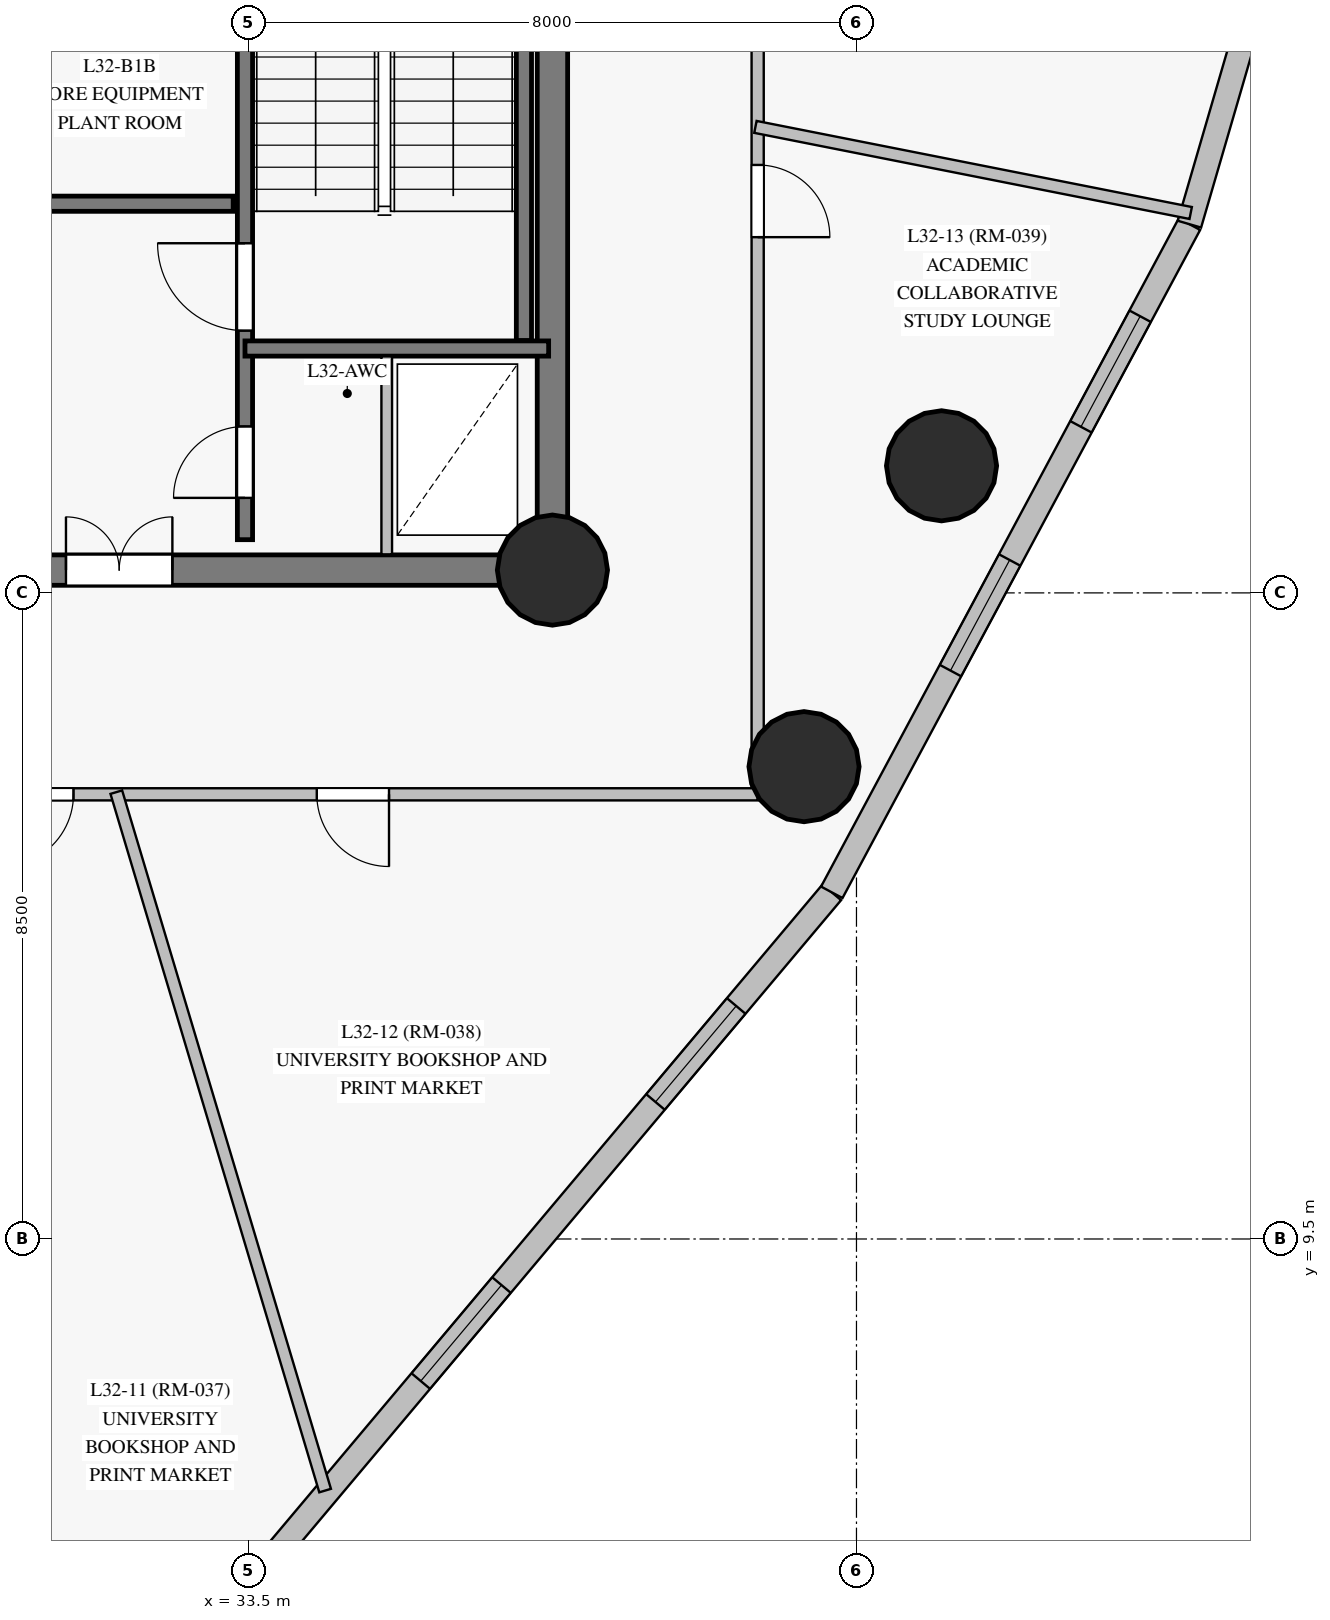
"""IFC4 building model, lengths in metres.
Left out: names, types, materials, properties, quantities, classifications, styles, units other than length and angle.
Written with IfcOpenShell. Run it as: python <this file> out.ifc"""

import sys

from ifc_helpers import new_model, si_unit, direction, frame, frame_2d, origin, origin_with_axes, origin_2d, place, context, subcontext, project, spatial, rectangle, circle, extrude, source, transform, mapped, element, fill, save


model = new_model("IFC4")
c1 = context("Model", 3, precision=1e-05, world=origin(), true_north=direction((0.0, 1.0)))
c2 = subcontext(c1, "Body", "Model", "MODEL_VIEW")
j1 = project(units=[si_unit("LENGTHUNIT", "METRE"), si_unit("PLANEANGLEUNIT", "RADIAN")], contexts=[c1])
p1 = place(None, origin())
s1 = spatial("IfcSite", under=j1, at=p1, CompositionType="ELEMENT")
p2 = place(p1, origin())
s2 = spatial("IfcBuilding", under=s1, at=p2, CompositionType="ELEMENT")
p3 = place(p2, frame((0.0, 0.0, 117.55)))
s3 = spatial("IfcBuildingStorey", under=s2, at=p3, CompositionType="ELEMENT", Elevation=117.55)
p4 = place(p3, frame((26.55, 18.3, 0.0), z_axis=(0.0, 0.0, 1.0), x_axis=(1.0, 0.0, 0.0)))
e1 = element("IfcWall", 1, at=p4, inside=s3, PredefinedType="SHEAR", context=c2, shape_type="SweptSolid", body=[
    extrude(rectangle(XDim=10.95, YDim=0.4, at=frame_2d((5.475, 0.0))), origin(), (0.0, 0.0, 1.0), 2.825),
])
p5 = place(p4, frame((4.55, 0.0, 0.0)))
e2 = element("IfcOpeningElement", 2, at=p5, cuts=e1, PredefinedType="OPENING", context=c2, shape_type="SweptSolid", body=[
    extrude(rectangle(XDim=1.4, YDim=2.2, at=frame_2d((0.7, 1.1))), frame((0.0, 0.21, 0.0), z_axis=(0.0, -1.0, 0.0), x_axis=(1.0, 0.0, 0.0)), (0.0, 0.0, 1.0), 0.42),
])
p6 = place(p3, frame((37.5, 18.3, 0.0), z_axis=(0.0, 0.0, 1.0), x_axis=(0.0, 1.0, 0.0)))
e3 = element("IfcWall", 3, at=p6, inside=s3, PredefinedType="SHEAR", context=c2, shape_type="SweptSolid", body=[
    extrude(rectangle(XDim=16.4, YDim=0.4, at=frame_2d((8.2, 0.0))), origin(), (0.0, 0.0, 1.0), 2.825),
])
p7 = place(p6, frame((14.15, 0.0, 0.0)))
e4 = element("IfcOpeningElement", 4, at=p7, cuts=e3, PredefinedType="OPENING", context=c2, shape_type="SweptSolid", body=[
    extrude(rectangle(XDim=1.2, YDim=2.15, at=frame_2d((0.6, 1.075))), frame((0.0, 0.21, 0.0), z_axis=(0.0, -1.0, 0.0), x_axis=(1.0, 0.0, 0.0)), (0.0, 0.0, 1.0), 0.42),
])
m1 = source(origin_with_axes(), c2, "Body", "SweptSolid", [
    extrude(circle(Radius=0.725, at=origin_2d()), origin(), (0.0, 0.0, 1.0), 3.05),
])
for number, where, z_axis, x_axis in (
    (5, (37.5, 18.3, 0.0), (0.0, 0.0, 1.0), (1.0, 0.0, 0.0)),
    (6, (42.619, 19.672, 0.0), (0.0, 0.0, 1.0), (1.0, 0.0, 0.0)),
    (7, (40.81, 15.714, 0.0), (0.0, 0.0, 1.0), (1.0, 0.0, 0.0)),
):
    element("IfcColumn", number, at=place(p3, frame(where, z_axis=z_axis, x_axis=x_axis)), inside=s3, PredefinedType="COLUMN", context=c2, shape_type="MappedRepresentation", body=[
        mapped(m1, transform((0.0, 0.0, 0.0), scale=1.0)),
    ])
p8 = place(p3, frame((31.944, 3.083, 0.0), z_axis=(0.0, 0.0, 1.0), x_axis=(0.643621916948, 0.765343601283, 0.0)))
e8 = element("IfcWall", 8, at=p8, inside=s3, PredefinedType="SOLIDWALL", context=c2, shape_type="SweptSolid", body=[
    extrude(rectangle(XDim=14.343, YDim=0.32, at=frame_2d((7.171, 0.0))), origin(), (0.0, 0.0, 1.0), 2.825),
])
p9 = place(p8, frame((1.229, 0.0, 0.85)))
e9 = element("IfcOpeningElement", 9, at=p9, cuts=e8, PredefinedType="OPENING", context=c2, shape_type="SweptSolid", body=[
    extrude(rectangle(XDim=1.65, YDim=1.65, at=frame_2d((0.825, 0.825))), frame((0.0, 0.17, 0.0), z_axis=(0.0, -1.0, 0.0), x_axis=(1.0, 0.0, 0.0)), (0.0, 0.0, 1.0), 0.34),
])
p10 = place(p8, frame((5.942, 0.0, 0.85)))
e10 = element("IfcOpeningElement", 10, at=p10, cuts=e8, PredefinedType="OPENING", context=c2, shape_type="SweptSolid", body=[
    extrude(rectangle(XDim=1.65, YDim=1.65, at=frame_2d((0.825, 0.825))), frame((0.0, 0.17, 0.0), z_axis=(0.0, -1.0, 0.0), x_axis=(1.0, 0.0, 0.0)), (0.0, 0.0, 1.0), 0.34),
])
p11 = place(p8, frame((10.739, 0.0, 0.85)))
e11 = element("IfcOpeningElement", 11, at=p11, cuts=e8, PredefinedType="OPENING", context=c2, shape_type="SweptSolid", body=[
    extrude(rectangle(XDim=1.65, YDim=1.65, at=frame_2d((0.825, 0.825))), frame((0.0, 0.17, 0.0), z_axis=(0.0, -1.0, 0.0), x_axis=(1.0, 0.0, 0.0)), (0.0, 0.0, 1.0), 0.34),
])
p12 = place(p3, frame((41.175, 14.061, 0.0), z_axis=(0.0, 0.0, 1.0), x_axis=(0.471938707329, 0.881631360902, 0.0)))
e12 = element("IfcWall", 12, at=p12, inside=s3, PredefinedType="SOLIDWALL", context=c2, shape_type="SweptSolid", body=[
    extrude(rectangle(XDim=9.97, YDim=0.32, at=frame_2d((4.985, 0.0))), origin(), (0.0, 0.0, 1.0), 2.825),
])
p13 = place(p12, frame((3.309, 0.0, 0.85)))
e13 = element("IfcOpeningElement", 13, at=p13, cuts=e12, PredefinedType="OPENING", context=c2, shape_type="SweptSolid", body=[
    extrude(rectangle(XDim=1.65, YDim=1.65, at=frame_2d((0.825, 0.825))), frame((0.0, 0.17, 0.0), z_axis=(0.0, -1.0, 0.0), x_axis=(1.0, 0.0, 0.0)), (0.0, 0.0, 1.0), 0.34),
])
p14 = place(p12, frame((6.947, 0.0, 0.85)))
e14 = element("IfcOpeningElement", 14, at=p14, cuts=e12, PredefinedType="OPENING", context=c2, shape_type="SweptSolid", body=[
    extrude(rectangle(XDim=1.65, YDim=1.65, at=frame_2d((0.825, 0.825))), frame((0.0, 0.17, 0.0), z_axis=(0.0, -1.0, 0.0), x_axis=(1.0, 0.0, 0.0)), (0.0, 0.0, 1.0), 0.34),
])
p15 = place(p3, frame((45.88, 22.851, 0.0), z_axis=(0.0, 0.0, 1.0), x_axis=(0.279941825512, 0.960016965647, 0.0)))
e15 = element("IfcWall", 15, at=p15, inside=s3, PredefinedType="SOLIDWALL", context=c2, shape_type="SweptSolid", body=[
    extrude(rectangle(XDim=14.343, YDim=0.32, at=frame_2d((7.171, 0.0))), origin(), (0.0, 0.0, 1.0), 2.825),
])
p16 = place(p15, frame((2.843, 0.0, 0.85)))
e16 = element("IfcOpeningElement", 16, at=p16, cuts=e15, PredefinedType="OPENING", context=c2, shape_type="SweptSolid", body=[
    extrude(rectangle(XDim=1.65, YDim=1.65, at=frame_2d((0.825, 0.825))), frame((0.0, 0.17, 0.0), z_axis=(0.0, -1.0, 0.0), x_axis=(1.0, 0.0, 0.0)), (0.0, 0.0, 1.0), 0.34),
])
p17 = place(p15, frame((9.076, 0.0, 0.85)))
e17 = element("IfcOpeningElement", 17, at=p17, cuts=e15, PredefinedType="OPENING", context=c2, shape_type="SweptSolid", body=[
    extrude(rectangle(XDim=1.65, YDim=1.65, at=frame_2d((0.825, 0.825))), frame((0.0, 0.17, 0.0), z_axis=(0.0, -1.0, 0.0), x_axis=(1.0, 0.0, 0.0)), (0.0, 0.0, 1.0), 0.34),
])
p18 = place(p3, frame((33.455, 18.7, 0.0), z_axis=(0.0, 0.0, 1.0), x_axis=(0.0, 1.0, 0.0)))
e18 = element("IfcWall", 18, at=p18, inside=s3, PredefinedType="SHEAR", context=c2, shape_type="SweptSolid", body=[
    extrude(rectangle(XDim=15.6, YDim=0.2, at=frame_2d((7.8, 0.0))), origin(), (0.0, 0.0, 1.0), 2.825),
])
p19 = place(p18, frame((2.75, 0.0, 0.0)))
e19 = element("IfcOpeningElement", 19, at=p19, cuts=e18, PredefinedType="OPENING", context=c2, shape_type="SweptSolid", body=[
    extrude(rectangle(XDim=1.15, YDim=2.15, at=frame_2d((0.575, 1.075))), frame((0.0, 0.11, 0.0), z_axis=(0.0, -1.0, 0.0), x_axis=(1.0, 0.0, 0.0)), (0.0, 0.0, 1.0), 0.22),
])
p20 = place(p18, frame((0.55, 0.0, 0.0)))
e20 = element("IfcOpeningElement", 20, at=p20, cuts=e18, PredefinedType="OPENING", context=c2, shape_type="SweptSolid", body=[
    extrude(rectangle(XDim=0.94, YDim=2.1, at=frame_2d((0.47, 1.05))), frame((0.0, 0.11, 0.0), z_axis=(0.0, -1.0, 0.0), x_axis=(1.0, 0.0, 0.0)), (0.0, 0.0, 1.0), 0.22),
])
p21 = place(p3, frame((23.7, 23.12, 0.0), z_axis=(0.0, 0.0, 1.0), x_axis=(1.0, 0.0, 0.0)))
e21 = element("IfcWall", 21, at=p21, inside=s3, PredefinedType="SHEAR", context=c2, shape_type="SweptSolid", body=[
    extrude(rectangle(XDim=9.6, YDim=0.2, at=frame_2d((4.8, 0.0))), origin(), (0.0, 0.0, 1.0), 2.825),
])
p22 = place(p21, frame((1.1, 0.0, 0.0)))
e22 = element("IfcOpeningElement", 22, at=p22, cuts=e21, PredefinedType="OPENING", context=c2, shape_type="SweptSolid", body=[
    extrude(rectangle(XDim=0.92, YDim=2.1, at=frame_2d((0.46, 1.05))), frame((0.0, 0.11, 0.0), z_axis=(0.0, -1.0, 0.0), x_axis=(1.0, 0.0, 0.0)), (0.0, 0.0, 1.0), 0.22),
])
p23 = place(p21, frame((5.2, 0.0, 0.0)))
e23 = element("IfcOpeningElement", 23, at=p23, cuts=e21, PredefinedType="OPENING", context=c2, shape_type="SweptSolid", body=[
    extrude(rectangle(XDim=1.0, YDim=2.15, at=frame_2d((0.5, 1.075))), frame((0.0, 0.11, 0.0), z_axis=(0.0, -1.0, 0.0), x_axis=(1.0, 0.0, 0.0)), (0.0, 0.0, 1.0), 0.22),
])
p24 = place(p3, frame((37.125, 21.32, 0.0), z_axis=(0.0, 0.0, 1.0), x_axis=(0.0, 1.0, 0.0)))
e24 = element("IfcWall", 24, at=p24, inside=s3, PredefinedType="SHEAR", context=c2, shape_type="SweptSolid", body=[
    extrude(rectangle(XDim=7.5, YDim=0.2, at=frame_2d((3.75, 0.0))), origin(), (0.0, 0.0, 1.0), 2.825),
])
p25 = place(p3, frame((33.455, 21.215, 0.0), z_axis=(0.0, 0.0, 1.0), x_axis=(1.0, 0.0, 0.0)))
e25 = element("IfcWall", 25, at=p25, inside=s3, PredefinedType="SHEAR", context=c2, shape_type="SweptSolid", body=[
    extrude(rectangle(XDim=3.995, YDim=0.2, at=frame_2d((1.998, 0.0))), origin(), (0.0, 0.0, 1.0), 2.825),
])
p26 = place(p3, frame((40.2, 37.65, 0.0), z_axis=(0.0, 0.0, 1.0), x_axis=(0.0, -1.0, 0.0)))
e26 = element("IfcWall", 26, at=p26, inside=s3, PredefinedType="PARTITIONING", context=c2, shape_type="SweptSolid", body=[
    extrude(rectangle(XDim=22.3, YDim=0.16, at=frame_2d((11.15, 0.0))), origin(), (0.0, 0.0, 1.0), 2.325),
])
p27 = place(p26, frame((14.02, 0.0, 0.0)))
e27 = element("IfcOpeningElement", 27, at=p27, cuts=e26, PredefinedType="OPENING", context=c2, shape_type="SweptSolid", body=[
    extrude(rectangle(XDim=0.95, YDim=2.15, at=frame_2d((0.475, 1.075))), frame((0.0, 0.09, 0.0), z_axis=(0.0, -1.0, 0.0), x_axis=(1.0, 0.0, 0.0)), (0.0, 0.0, 1.0), 0.18),
])
p28 = place(p26, frame((10.675, 0.0, 0.0)))
e28 = element("IfcOpeningElement", 28, at=p28, cuts=e26, PredefinedType="OPENING", context=c2, shape_type="SweptSolid", body=[
    extrude(rectangle(XDim=0.95, YDim=2.15, at=frame_2d((0.475, 1.075))), frame((0.0, 0.09, 0.0), z_axis=(0.0, -1.0, 0.0), x_axis=(1.0, 0.0, 0.0)), (0.0, 0.0, 1.0), 0.18),
])
p29 = place(p26, frame((7.33, 0.0, 0.0)))
e29 = element("IfcOpeningElement", 29, at=p29, cuts=e26, PredefinedType="OPENING", context=c2, shape_type="SweptSolid", body=[
    extrude(rectangle(XDim=0.95, YDim=2.15, at=frame_2d((0.475, 1.075))), frame((0.0, 0.09, 0.0), z_axis=(0.0, -1.0, 0.0), x_axis=(1.0, 0.0, 0.0)), (0.0, 0.0, 1.0), 0.18),
])
p30 = place(p26, frame((5.1, 0.0, 0.0)))
e30 = element("IfcOpeningElement", 30, at=p30, cuts=e26, PredefinedType="OPENING", context=c2, shape_type="SweptSolid", body=[
    extrude(rectangle(XDim=0.95, YDim=2.15, at=frame_2d((0.475, 1.075))), frame((0.0, 0.09, 0.0), z_axis=(0.0, -1.0, 0.0), x_axis=(1.0, 0.0, 0.0)), (0.0, 0.0, 1.0), 0.18),
])
p31 = place(p26, frame((1.548, 0.0, 0.0)))
e31 = element("IfcOpeningElement", 31, at=p31, cuts=e26, PredefinedType="OPENING", context=c2, shape_type="SweptSolid", body=[
    extrude(rectangle(XDim=0.95, YDim=2.15, at=frame_2d((0.475, 1.075))), frame((0.0, 0.09, 0.0), z_axis=(0.0, -1.0, 0.0), x_axis=(1.0, 0.0, 0.0)), (0.0, 0.0, 1.0), 0.18),
])
p32 = place(p3, frame((40.2, 15.35, 0.0), z_axis=(0.0, 0.0, 1.0), x_axis=(-1.0, 0.0, 0.0)))
e32 = element("IfcWall", 32, at=p32, inside=s3, PredefinedType="PARTITIONING", context=c2, shape_type="SweptSolid", body=[
    extrude(rectangle(XDim=10.65, YDim=0.16, at=frame_2d((5.325, 0.0))), origin(), (0.0, 0.0, 1.0), 2.225),
])
p33 = place(p32, frame((9.001, 0.0, 0.0)))
e33 = element("IfcOpeningElement", 33, at=p33, cuts=e32, PredefinedType="OPENING", context=c2, shape_type="SweptSolid", body=[
    extrude(rectangle(XDim=0.95, YDim=2.15, at=frame_2d((0.475, 1.075))), frame((0.0, 0.09, 0.0), z_axis=(0.0, -1.0, 0.0), x_axis=(1.0, 0.0, 0.0)), (0.0, 0.0, 1.0), 0.18),
])
p34 = place(p32, frame((4.85, 0.0, 0.0)))
e34 = element("IfcOpeningElement", 34, at=p34, cuts=e32, PredefinedType="OPENING", context=c2, shape_type="SweptSolid", body=[
    extrude(rectangle(XDim=0.95, YDim=2.15, at=frame_2d((0.475, 1.075))), frame((0.0, 0.09, 0.0), z_axis=(0.0, -1.0, 0.0), x_axis=(1.0, 0.0, 0.0)), (0.0, 0.0, 1.0), 0.18),
])
p35 = place(p3, frame((31.762, 15.379, 0.0), z_axis=(0.0, 0.0, 1.0), x_axis=(0.286457964324, -0.958092811097, 0.0)))
e35 = element("IfcWall", 35, at=p35, inside=s3, PredefinedType="PARTITIONING", context=c2, shape_type="SweptSolid", body=[
    extrude(rectangle(XDim=9.591, YDim=0.16, at=frame_2d((4.795, 0.0))), origin(), (0.0, 0.0, 1.0), 2.825),
])
p36 = place(p3, frame((40.171, 24.131, 0.0), z_axis=(0.0, 0.0, 1.0), x_axis=(0.980996692058, -0.194024457662, 0.0)))
e36 = element("IfcWall", 36, at=p36, inside=s3, PredefinedType="PARTITIONING", context=c2, shape_type="SweptSolid", body=[
    extrude(rectangle(XDim=5.837, YDim=0.16, at=frame_2d((2.918, 0.0))), origin(), (0.0, 0.0, 1.0), 2.825),
])
p37 = place(p3, frame((35.32, 18.507, 0.0), z_axis=(0.0, 0.0, 1.0), x_axis=(0.0, 1.0, 0.0)))
e37 = element("IfcWall", 37, at=p37, inside=s3, PredefinedType="PARTITIONING", context=c2, shape_type="SweptSolid", body=[
    extrude(rectangle(XDim=2.604, YDim=0.14, at=frame_2d((1.302, 0.0))), origin(), (0.0, 0.0, 1.0), 2.825),
])
m2 = source(origin_with_axes(), c2, "Body", "SweptSolid", [
    extrude(rectangle(XDim=1.65, YDim=1.65, at=frame_2d((0.825, 0.825))), frame((0.0, 0.03, 0.0), z_axis=(0.0, -1.0, 0.0), x_axis=(1.0, 0.0, 0.0)), (0.0, 0.0, 1.0), 0.06),
])
p38 = place(p10, origin())
e38 = element("IfcWindow", 38, at=p38, inside=s3, PartitioningType="SINGLE_PANEL", PredefinedType="WINDOW", context=c2, shape_type="MappedRepresentation", body=[
    mapped(m2, transform((0.0, 0.0, 0.0), scale=1.0)),
])
fill(e10, e38)
p39 = place(p11, origin())
e39 = element("IfcWindow", 39, at=p39, inside=s3, PartitioningType="SINGLE_PANEL", PredefinedType="WINDOW", context=c2, shape_type="MappedRepresentation", body=[
    mapped(m2, transform((0.0, 0.0, 0.0), scale=1.0)),
])
fill(e11, e39)
p40 = place(p13, origin())
e40 = element("IfcWindow", 40, at=p40, inside=s3, PartitioningType="SINGLE_PANEL", PredefinedType="WINDOW", context=c2, shape_type="MappedRepresentation", body=[
    mapped(m2, transform((0.0, 0.0, 0.0), scale=1.0)),
])
fill(e13, e40)
p41 = place(p14, origin())
e41 = element("IfcWindow", 41, at=p41, inside=s3, PartitioningType="SINGLE_PANEL", PredefinedType="WINDOW", context=c2, shape_type="MappedRepresentation", body=[
    mapped(m2, transform((0.0, 0.0, 0.0), scale=1.0)),
])
fill(e14, e41)
m3 = source(origin_with_axes(), c2, "Body", "SweptSolid", [
    extrude(rectangle(XDim=1.15, YDim=2.15, at=frame_2d((0.575, 1.075))), frame((0.0, 0.025, 0.0), z_axis=(0.0, -1.0, 0.0), x_axis=(1.0, 0.0, 0.0)), (0.0, 0.0, 1.0), 0.05),
])
p42 = place(p19, origin())
e42 = element("IfcDoor", 42, at=p42, inside=s3, OperationType="SINGLE_SWING_RIGHT", PredefinedType="DOOR", context=c2, shape_type="MappedRepresentation", body=[
    mapped(m3, transform((0.0, 0.0, 0.0), scale=1.0)),
])
fill(e19, e42)
m4 = source(origin_with_axes(), c2, "Body", "SweptSolid", [
    extrude(rectangle(XDim=1.4, YDim=2.2, at=frame_2d((0.7, 1.1))), frame((0.0, 0.025, 0.0), z_axis=(0.0, -1.0, 0.0), x_axis=(1.0, 0.0, 0.0)), (0.0, 0.0, 1.0), 0.05),
])
p43 = place(p5, origin())
e43 = element("IfcDoor", 43, at=p43, inside=s3, OperationType="DOUBLE_DOOR_SINGLE_SWING", PredefinedType="DOOR", context=c2, shape_type="MappedRepresentation", body=[
    mapped(m4, transform((0.0, 0.0, 0.0), scale=1.0)),
])
fill(e2, e43)
m5 = source(origin_with_axes(), c2, "Body", "SweptSolid", [
    extrude(rectangle(XDim=0.94, YDim=2.1, at=frame_2d((0.47, 1.05))), frame((0.0, 0.025, 0.0), z_axis=(0.0, -1.0, 0.0), x_axis=(1.0, 0.0, 0.0)), (0.0, 0.0, 1.0), 0.05),
])
p44 = place(p20, origin())
e44 = element("IfcDoor", 44, at=p44, inside=s3, OperationType="SINGLE_SWING_LEFT", PredefinedType="DOOR", context=c2, shape_type="MappedRepresentation", body=[
    mapped(m5, transform((0.0, 0.0, 0.0), scale=1.0)),
])
fill(e20, e44)
m6 = source(origin_with_axes(), c2, "Body", "SweptSolid", [
    extrude(rectangle(XDim=0.95, YDim=2.15, at=frame_2d((0.475, 1.075))), frame((0.0, 0.025, 0.0), z_axis=(0.0, -1.0, 0.0), x_axis=(1.0, 0.0, 0.0)), (0.0, 0.0, 1.0), 0.05),
])
p45 = place(p33, origin())
e45 = element("IfcDoor", 45, at=p45, inside=s3, OperationType="SINGLE_SWING_RIGHT", PredefinedType="DOOR", context=c2, shape_type="MappedRepresentation", body=[
    mapped(m6, transform((0.0, 0.0, 0.0), scale=1.0)),
])
fill(e33, e45)
p46 = place(p34, origin())
e46 = element("IfcDoor", 46, at=p46, inside=s3, OperationType="SINGLE_SWING_LEFT", PredefinedType="DOOR", context=c2, shape_type="MappedRepresentation", body=[
    mapped(m6, transform((0.0, 0.0, 0.0), scale=1.0)),
])
fill(e34, e46)
p47 = place(p27, origin())
e47 = element("IfcDoor", 47, at=p47, inside=s3, OperationType="SINGLE_SWING_RIGHT", PredefinedType="DOOR", context=c2, shape_type="MappedRepresentation", body=[
    mapped(m6, transform((0.0, 0.0, 0.0), scale=1.0)),
])
fill(e27, e47)
save(model, sys.argv[1])
